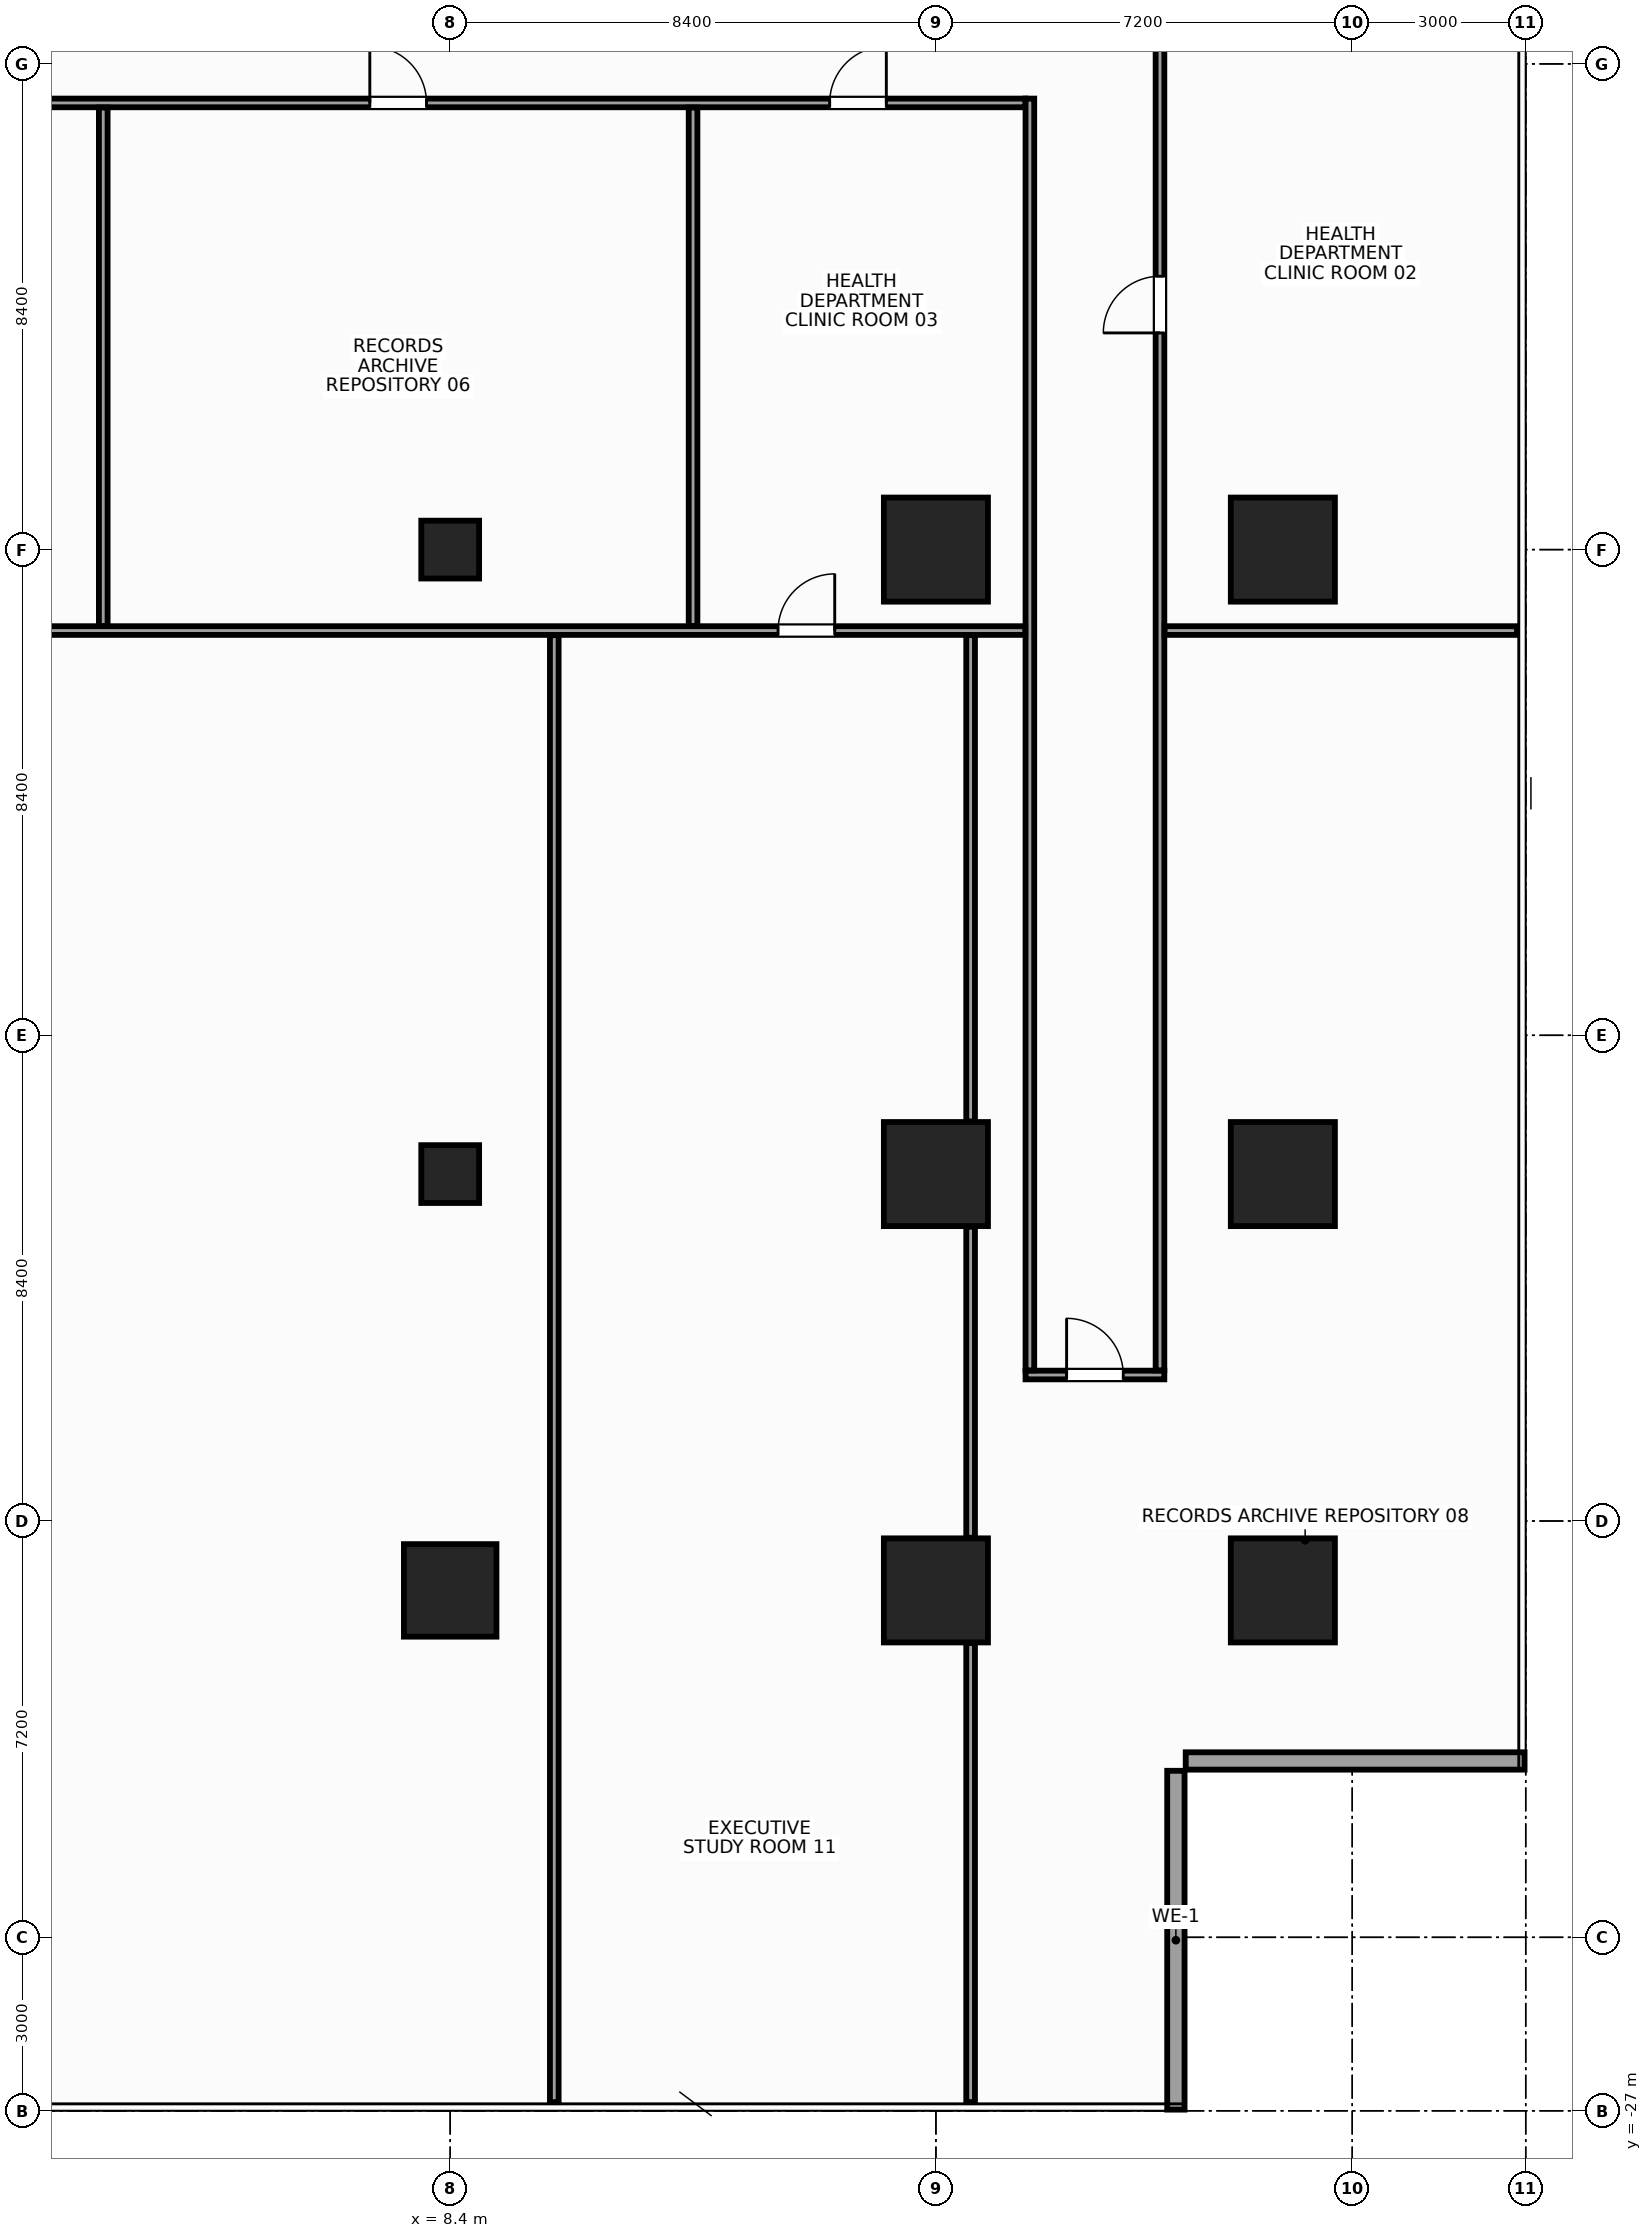
"""IFC4 building model, lengths in metres.
Left out: names, types, materials, properties, quantities, classifications, styles, units other than length and angle.
Written with IfcOpenShell. Run it as: python <this file> out.ifc"""

import sys

from ifc_helpers import new_model, si_unit, direction, frame, frame_2d, origin, origin_2d, place, context, subcontext, project, spatial, rectangle, hollow_rectangle, extrude, source, transform, mapped, element, fill, save


model = new_model("IFC4")
c1 = context("Model", 3, precision=1e-05, world=origin(), true_north=direction((0.0, 1.0)))
c2 = subcontext(c1, "Body", "Model", "MODEL_VIEW")
j1 = project(units=[si_unit("LENGTHUNIT", "METRE"), si_unit("PLANEANGLEUNIT", "RADIAN")], contexts=[c1])
p1 = place(None, origin())
s1 = spatial("IfcSite", under=j1, at=p1, CompositionType="ELEMENT")
p2 = place(p1, origin())
s2 = spatial("IfcBuilding", under=s1, at=p2, CompositionType="ELEMENT")
p3 = place(p2, frame((0.0, 0.0, 48.8)))
s3 = spatial("IfcBuildingStorey", under=s2, at=p3, CompositionType="ELEMENT", Elevation=48.8)
m1 = source(origin(), c2, "Body", "SweptSolid", [
    extrude(rectangle(XDim=1.8, YDim=1.8, at=origin_2d()), origin(), (0.0, 0.0, 1.0), 3.6),
])
for number, where, z_axis, x_axis in (
    (1, (16.8, -18.0, 0.0), (0.0, 0.0, 1.0), (1.0, 0.0, 0.0)),
    (2, (16.8, -10.8, 0.0), (0.0, 0.0, 1.0), (1.0, 0.0, 0.0)),
    (3, (16.8, 0.0, 0.0), (0.0, 0.0, 1.0), (1.0, 0.0, 0.0)),
    (4, (22.8, -18.0, 0.0), (0.0, 0.0, 1.0), (1.0, 0.0, 0.0)),
    (5, (22.8, -10.8, 0.0), (0.0, 0.0, 1.0), (1.0, 0.0, 0.0)),
    (6, (22.8, 0.0, 0.0), (0.0, 0.0, 1.0), (1.0, 0.0, 0.0)),
):
    element("IfcColumn", number, at=place(p3, frame(where, z_axis=z_axis, x_axis=x_axis)), inside=s3, PredefinedType="COLUMN", context=c2, shape_type="MappedRepresentation", body=[
        mapped(m1, transform((0.0, 0.0, 0.0), x_axis=(1.0, 0.0, 0.0), y_axis=(0.0, 1.0, 0.0), z_axis=(0.0, 0.0, 1.0), scale=1.0)),
    ])
m2 = source(origin(), c2, "Body", "SweptSolid", [
    extrude(rectangle(XDim=1.6, YDim=1.6, at=origin_2d()), origin(), (0.0, 0.0, 1.0), 3.6),
])
p4 = place(p3, frame((8.4, -18.0, 0.0), z_axis=(0.0, 0.0, 1.0), x_axis=(1.0, 0.0, 0.0)))
e7 = element("IfcColumn", 7, at=p4, inside=s3, PredefinedType="COLUMN", context=c2, shape_type="MappedRepresentation", body=[
    mapped(m2, transform((0.0, 0.0, 0.0), x_axis=(1.0, 0.0, 0.0), y_axis=(0.0, 1.0, 0.0), z_axis=(0.0, 0.0, 1.0), scale=1.0)),
])
m3 = source(origin(), c2, "Body", "SweptSolid", [
    extrude(hollow_rectangle(XDim=1.0, YDim=1.0, WallThickness=0.045, at=origin_2d()), origin(), (0.0, 0.0, 1.0), 3.6),
])
for number, where, z_axis, x_axis in (
    (8, (8.4, 0.0, 0.0), (0.0, 0.0, 1.0), (1.0, 0.0, 0.0)),
    (9, (8.4, -10.8, 0.0), (0.0, 0.0, 1.0), (1.0, 0.0, 0.0)),
):
    element("IfcColumn", number, at=place(p3, frame(where, z_axis=z_axis, x_axis=x_axis)), inside=s3, PredefinedType="COLUMN", context=c2, shape_type="MappedRepresentation", body=[
        mapped(m3, transform((0.0, 0.0, 0.0), x_axis=(1.0, 0.0, 0.0), y_axis=(0.0, 1.0, 0.0), z_axis=(0.0, 0.0, 1.0), scale=1.0)),
    ])
m4 = source(origin(), c2, "Body", "SweptSolid", [
    extrude(rectangle(XDim=5.86, YDim=0.3, at=frame_2d((2.93, 0.0))), origin(), (0.0, 0.0, 1.0), 2.74),
])
for number, where, z_axis, x_axis in (
    (10, (20.95, -26.98, 0.0), (0.0, 0.0, 1.0), (0.0, 1.0, 0.0)),
    (11, (21.12, -20.95, 0.0), (0.0, 0.0, 1.0), (1.0, 0.0, 0.0)),
):
    element("IfcWall", number, at=place(p3, frame(where, z_axis=z_axis, x_axis=x_axis)), inside=s3, PredefinedType="STANDARD", context=c2, shape_type="MappedRepresentation", body=[
        mapped(m4, transform((0.0, 0.0, 0.0), x_axis=(1.0, 0.0, 0.0), y_axis=(0.0, 1.0, 0.0), z_axis=(0.0, 0.0, 1.0), scale=1.0)),
    ])
m5 = source(origin(), c2, "Body", "SweptSolid", [
    extrude(rectangle(XDim=36.7, YDim=0.15, at=frame_2d((18.35, 0.0))), origin(), (0.0, 0.0, 1.0), 2.745),
])
p5 = place(p3, frame((-18.35, 7.725, 0.0), z_axis=(0.0, 0.0, 1.0), x_axis=(1.0, 0.0, 0.0)))
e12 = element("IfcWall", 12, at=p5, inside=s3, PredefinedType="PARTITIONING", context=c2, shape_type="MappedRepresentation", body=[
    mapped(m5, transform((0.0, 0.0, 0.0), x_axis=(1.0, 0.0, 0.0), y_axis=(0.0, 1.0, 0.0), z_axis=(0.0, 0.0, 1.0), scale=1.0)),
])
p6 = place(p5, frame((33.312, 0.0, 0.0)))
e13 = element("IfcOpeningElement", 13, at=p6, cuts=e12, PredefinedType="OPENING", context=c2, shape_type="SweptSolid", body=[
    extrude(rectangle(XDim=0.98, YDim=2.15, at=frame_2d((0.49, 1.075))), frame((0.0, 0.087, 0.0), z_axis=(0.0, -1.0, 0.0), x_axis=(1.0, 0.0, 0.0)), (0.0, 0.0, 1.0), 0.174),
])
p7 = place(p5, frame((4.107, 0.0, 0.0)))
e14 = element("IfcOpeningElement", 14, at=p7, cuts=e12, PredefinedType="OPENING", context=c2, shape_type="SweptSolid", body=[
    extrude(rectangle(XDim=0.98, YDim=2.15, at=frame_2d((0.49, 1.075))), frame((0.0, 0.087, 0.0), z_axis=(0.0, -1.0, 0.0), x_axis=(1.0, 0.0, 0.0)), (0.0, 0.0, 1.0), 0.174),
])
p8 = place(p5, frame((14.46, 0.0, 0.0)))
e15 = element("IfcOpeningElement", 15, at=p8, cuts=e12, PredefinedType="OPENING", context=c2, shape_type="SweptSolid", body=[
    extrude(rectangle(XDim=0.98, YDim=2.15, at=frame_2d((0.49, 1.075))), frame((0.0, 0.087, 0.0), z_axis=(0.0, -1.0, 0.0), x_axis=(1.0, 0.0, 0.0)), (0.0, 0.0, 1.0), 0.174),
])
p9 = place(p5, frame((25.36, 0.0, 0.0)))
e16 = element("IfcOpeningElement", 16, at=p9, cuts=e12, PredefinedType="OPENING", context=c2, shape_type="SweptSolid", body=[
    extrude(rectangle(XDim=0.98, YDim=2.15, at=frame_2d((0.49, 1.075))), frame((0.0, 0.087, 0.0), z_axis=(0.0, -1.0, 0.0), x_axis=(1.0, 0.0, 0.0)), (0.0, 0.0, 1.0), 0.174),
])
m6 = source(origin(), c2, "Body", "SweptSolid", [
    extrude(rectangle(XDim=2.4, YDim=0.15, at=frame_2d((1.2, 0.0))), origin(), (0.0, 0.0, 1.0), 2.945),
])
p10 = place(p3, frame((18.35, -14.275, 0.0), z_axis=(0.0, 0.0, 1.0), x_axis=(1.0, 0.0, 0.0)))
e17 = element("IfcWall", 17, at=p10, inside=s3, PredefinedType="PARTITIONING", context=c2, shape_type="MappedRepresentation", body=[
    mapped(m6, transform((0.0, 0.0, 0.0), x_axis=(1.0, 0.0, 0.0), y_axis=(0.0, 1.0, 0.0), z_axis=(0.0, 0.0, 1.0), scale=1.0)),
])
p11 = place(p10, frame((0.71, 0.0, 0.0)))
e18 = element("IfcOpeningElement", 18, at=p11, cuts=e17, PredefinedType="OPENING", context=c2, shape_type="SweptSolid", body=[
    extrude(rectangle(XDim=0.98, YDim=2.15, at=frame_2d((0.49, 1.075))), frame((0.0, 0.087, 0.0), z_axis=(0.0, -1.0, 0.0), x_axis=(1.0, 0.0, 0.0)), (0.0, 0.0, 1.0), 0.174),
])
m7 = source(origin(), c2, "Body", "SweptSolid", [
    extrude(rectangle(XDim=21.995, YDim=0.15, at=frame_2d((10.998, 0.0))), origin(), (0.0, 0.0, 1.0), 2.745),
])
p12 = place(p3, frame((18.425, -14.195, 0.0), z_axis=(0.0, 0.0, 1.0), x_axis=(0.0, 1.0, 0.0)))
e19 = element("IfcWall", 19, at=p12, inside=s3, PredefinedType="PARTITIONING", context=c2, shape_type="MappedRepresentation", body=[
    mapped(m7, transform((0.0, 0.0, 0.0), x_axis=(1.0, 0.0, 0.0), y_axis=(0.0, 1.0, 0.0), z_axis=(0.0, 0.0, 1.0), scale=1.0)),
])
m8 = source(origin(), c2, "Body", "SweptSolid", [
    extrude(rectangle(XDim=24.115, YDim=0.15, at=frame_2d((12.058, 0.0))), origin(), (0.0, 0.0, 1.0), 2.745),
])
p13 = place(p3, frame((20.675, -14.195, 0.0), z_axis=(0.0, 0.0, 1.0), x_axis=(0.0, 1.0, 0.0)))
e20 = element("IfcWall", 20, at=p13, inside=s3, PredefinedType="PARTITIONING", context=c2, shape_type="MappedRepresentation", body=[
    mapped(m8, transform((0.0, 0.0, 0.0), x_axis=(1.0, 0.0, 0.0), y_axis=(0.0, 1.0, 0.0), z_axis=(0.0, 0.0, 1.0), scale=1.0)),
])
p14 = place(p13, frame((17.942, 0.0, 0.0)))
e21 = element("IfcOpeningElement", 21, at=p14, cuts=e20, PredefinedType="OPENING", context=c2, shape_type="SweptSolid", body=[
    extrude(rectangle(XDim=0.98, YDim=2.15, at=frame_2d((0.49, 1.075))), frame((0.0, 0.087, 0.0), z_axis=(0.0, -1.0, 0.0), x_axis=(1.0, 0.0, 0.0)), (0.0, 0.0, 1.0), 0.174),
])
m9 = source(origin(), c2, "Body", "SweptSolid", [
    extrude(rectangle(XDim=36.69, YDim=0.15, at=frame_2d((18.345, 0.0))), origin(), (0.0, 0.0, 1.0), 2.745),
])
p15 = place(p3, frame((-18.345, -1.4, 0.0), z_axis=(0.0, 0.0, 1.0), x_axis=(1.0, 0.0, 0.0)))
e22 = element("IfcWall", 22, at=p15, inside=s3, PredefinedType="PARTITIONING", context=c2, shape_type="MappedRepresentation", body=[
    mapped(m9, transform((0.0, 0.0, 0.0), x_axis=(1.0, 0.0, 0.0), y_axis=(0.0, 1.0, 0.0), z_axis=(0.0, 0.0, 1.0), scale=1.0)),
])
p16 = place(p15, frame((14.455, 0.0, 0.0)))
e23 = element("IfcOpeningElement", 23, at=p16, cuts=e22, PredefinedType="OPENING", context=c2, shape_type="SweptSolid", body=[
    extrude(rectangle(XDim=0.98, YDim=2.15, at=frame_2d((0.49, 1.075))), frame((0.0, 0.087, 0.0), z_axis=(0.0, -1.0, 0.0), x_axis=(1.0, 0.0, 0.0)), (0.0, 0.0, 1.0), 0.174),
])
p17 = place(p15, frame((4.055, 0.0, 0.0)))
e24 = element("IfcOpeningElement", 24, at=p17, cuts=e22, PredefinedType="OPENING", context=c2, shape_type="SweptSolid", body=[
    extrude(rectangle(XDim=0.98, YDim=2.15, at=frame_2d((0.49, 1.075))), frame((0.0, 0.087, 0.0), z_axis=(0.0, -1.0, 0.0), x_axis=(1.0, 0.0, 0.0)), (0.0, 0.0, 1.0), 0.174),
])
p18 = place(p15, frame((32.415, 0.0, 0.0)))
e25 = element("IfcOpeningElement", 25, at=p18, cuts=e22, PredefinedType="OPENING", context=c2, shape_type="SweptSolid", body=[
    extrude(rectangle(XDim=0.98, YDim=2.15, at=frame_2d((0.49, 1.075))), frame((0.0, 0.087, 0.0), z_axis=(0.0, -1.0, 0.0), x_axis=(1.0, 0.0, 0.0)), (0.0, 0.0, 1.0), 0.174),
])
m10 = source(origin(), c2, "Body", "SweptSolid", [
    extrude(rectangle(XDim=6.095, YDim=0.15, at=frame_2d((3.048, 0.0))), origin(), (0.0, 0.0, 1.0), 2.745),
])
p19 = place(p3, frame((20.755, -1.4, 0.0), z_axis=(0.0, 0.0, 1.0), x_axis=(1.0, 0.0, 0.0)))
e26 = element("IfcWall", 26, at=p19, inside=s3, PredefinedType="PARTITIONING", context=c2, shape_type="MappedRepresentation", body=[
    mapped(m10, transform((0.0, 0.0, 0.0), x_axis=(1.0, 0.0, 0.0), y_axis=(0.0, 1.0, 0.0), z_axis=(0.0, 0.0, 1.0), scale=1.0)),
])
m11 = source(origin(), c2, "Body", "SweptSolid", [
    extrude(rectangle(XDim=8.965, YDim=0.15, at=frame_2d((4.482, 0.0))), origin(), (0.0, 0.0, 1.0), 2.645),
])
for number, where, z_axis, x_axis in (
    (27, (2.4, -1.32, 0.0), (0.0, 0.0, 1.0), (0.0, 1.0, 0.0)),
    (28, (12.6, -1.32, 0.0), (0.0, 0.0, 1.0), (0.0, 1.0, 0.0)),
):
    element("IfcWall", number, at=place(p3, frame(where, z_axis=z_axis, x_axis=x_axis)), inside=s3, PredefinedType="PARTITIONING", context=c2, shape_type="MappedRepresentation", body=[
        mapped(m11, transform((0.0, 0.0, 0.0), x_axis=(1.0, 0.0, 0.0), y_axis=(0.0, 1.0, 0.0), z_axis=(0.0, 0.0, 1.0), scale=1.0)),
    ])
m12 = source(origin(), c2, "Body", "SweptSolid", [
    extrude(rectangle(XDim=25.37, YDim=0.15, at=frame_2d((12.685, 0.0))), origin(), (0.0, 0.0, 1.0), 2.745),
])
p20 = place(p3, frame((10.2, -26.85, 0.0), z_axis=(0.0, 0.0, 1.0), x_axis=(0.0, 1.0, 0.0)))
e29 = element("IfcWall", 29, at=p20, inside=s3, PredefinedType="PARTITIONING", context=c2, shape_type="MappedRepresentation", body=[
    mapped(m12, transform((0.0, 0.0, 0.0), x_axis=(1.0, 0.0, 0.0), y_axis=(0.0, 1.0, 0.0), z_axis=(0.0, 0.0, 1.0), scale=1.0)),
])
m13 = source(origin(), c2, "Body", "SweptSolid", [
    extrude(rectangle(XDim=7.94, YDim=0.15, at=frame_2d((3.97, 0.0))), origin(), (0.0, 0.0, 1.0), 3.36),
])
p21 = place(p3, frame((17.4, -26.85, 0.0), z_axis=(0.0, 0.0, 1.0), x_axis=(0.0, 1.0, 0.0)))
e30 = element("IfcWall", 30, at=p21, inside=s3, PredefinedType="PARTITIONING", context=c2, shape_type="MappedRepresentation", body=[
    mapped(m13, transform((0.0, 0.0, 0.0), x_axis=(1.0, 0.0, 0.0), y_axis=(0.0, 1.0, 0.0), z_axis=(0.0, 0.0, 1.0), scale=1.0)),
])
m14 = source(origin(), c2, "Body", "SweptSolid", [
    extrude(rectangle(XDim=5.38, YDim=0.15, at=frame_2d((2.69, 0.0))), origin(), (0.0, 0.0, 1.0), 3.36),
])
p22 = place(p3, frame((17.4, -17.09, 0.0), z_axis=(0.0, 0.0, 1.0), x_axis=(0.0, 1.0, 0.0)))
e31 = element("IfcWall", 31, at=p22, inside=s3, PredefinedType="PARTITIONING", context=c2, shape_type="MappedRepresentation", body=[
    mapped(m14, transform((0.0, 0.0, 0.0), x_axis=(1.0, 0.0, 0.0), y_axis=(0.0, 1.0, 0.0), z_axis=(0.0, 0.0, 1.0), scale=1.0)),
])
m15 = source(origin(), c2, "Body", "SweptSolid", [
    extrude(rectangle(XDim=8.41, YDim=0.15, at=frame_2d((4.205, 0.0))), origin(), (0.0, 0.0, 1.0), 3.36),
])
p23 = place(p3, frame((17.4, -9.89, 0.0), z_axis=(0.0, 0.0, 1.0), x_axis=(0.0, 1.0, 0.0)))
e32 = element("IfcWall", 32, at=p23, inside=s3, PredefinedType="PARTITIONING", context=c2, shape_type="MappedRepresentation", body=[
    mapped(m15, transform((0.0, 0.0, 0.0), x_axis=(1.0, 0.0, 0.0), y_axis=(0.0, 1.0, 0.0), z_axis=(0.0, 0.0, 1.0), scale=1.0)),
])
m16 = source(origin(), c2, "Body", "SweptSolid", [
    extrude(rectangle(XDim=0.98, YDim=2.15, at=frame_2d((0.49, 1.075))), frame((0.0, 0.025, 0.0), z_axis=(0.0, -1.0, 0.0), x_axis=(1.0, 0.0, 0.0)), (0.0, 0.0, 1.0), 0.05),
])
p24 = place(p14, origin())
e33 = element("IfcDoor", 33, at=p24, inside=s3, OperationType="SINGLE_SWING_LEFT", PredefinedType="DOOR", context=c2, shape_type="MappedRepresentation", body=[
    mapped(m16, transform((0.0, 0.0, 0.0), x_axis=(1.0, 0.0, 0.0), y_axis=(0.0, 1.0, 0.0), z_axis=(0.0, 0.0, 1.0), scale=1.0)),
])
fill(e21, e33)
p25 = place(p6, origin())
e34 = element("IfcDoor", 34, at=p25, inside=s3, OperationType="SINGLE_SWING_RIGHT", PredefinedType="DOOR", context=c2, shape_type="MappedRepresentation", body=[
    mapped(m16, transform((0.0, 0.0, 0.0), x_axis=(1.0, 0.0, 0.0), y_axis=(0.0, 1.0, 0.0), z_axis=(0.0, 0.0, 1.0), scale=1.0)),
])
fill(e13, e34)
p26 = place(p9, origin())
e35 = element("IfcDoor", 35, at=p26, inside=s3, OperationType="SINGLE_SWING_LEFT", PredefinedType="DOOR", context=c2, shape_type="MappedRepresentation", body=[
    mapped(m16, transform((0.0, 0.0, 0.0), x_axis=(1.0, 0.0, 0.0), y_axis=(0.0, 1.0, 0.0), z_axis=(0.0, 0.0, 1.0), scale=1.0)),
])
fill(e16, e35)
p27 = place(p11, origin())
e36 = element("IfcDoor", 36, at=p27, inside=s3, OperationType="SINGLE_SWING_LEFT", PredefinedType="DOOR", context=c2, shape_type="MappedRepresentation", body=[
    mapped(m16, transform((0.0, 0.0, 0.0), x_axis=(1.0, 0.0, 0.0), y_axis=(0.0, 1.0, 0.0), z_axis=(0.0, 0.0, 1.0), scale=1.0)),
])
fill(e18, e36)
p28 = place(p18, origin())
e37 = element("IfcDoor", 37, at=p28, inside=s3, OperationType="SINGLE_SWING_RIGHT", PredefinedType="DOOR", context=c2, shape_type="MappedRepresentation", body=[
    mapped(m16, transform((0.0, 0.0, 0.0), x_axis=(1.0, 0.0, 0.0), y_axis=(0.0, 1.0, 0.0), z_axis=(0.0, 0.0, 1.0), scale=1.0)),
])
fill(e25, e37)
save(model, sys.argv[1])
